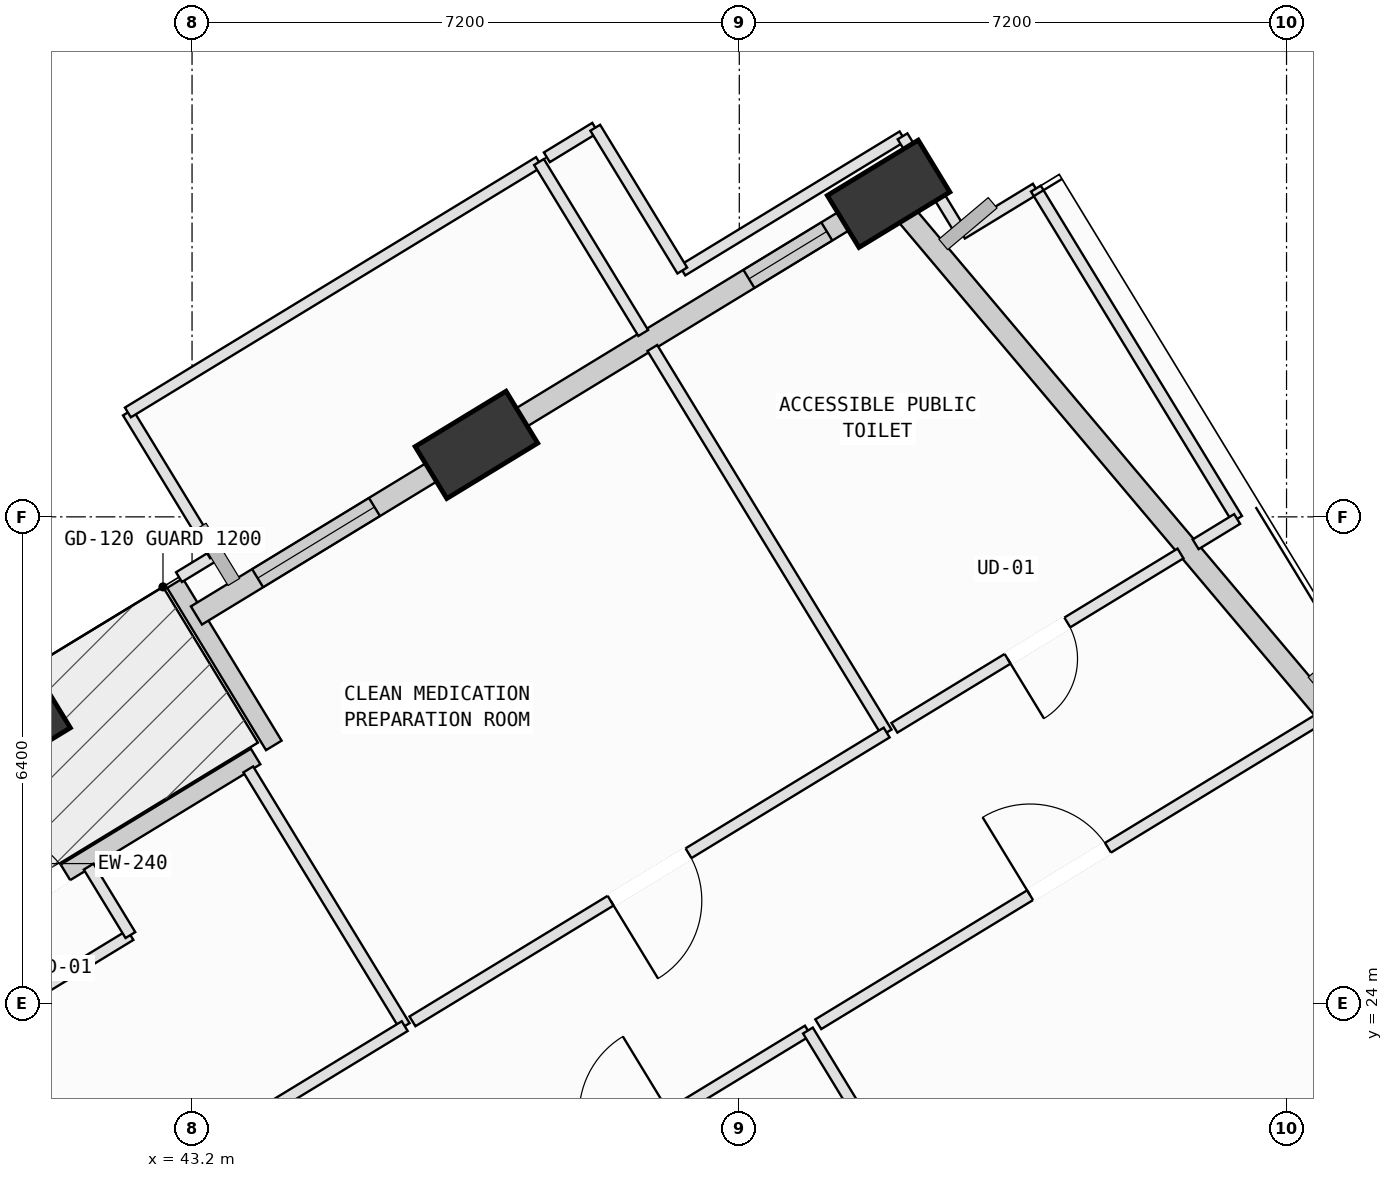
"""IFC4 building model, lengths in metres.
Left out: names, types, materials, properties, quantities, classifications, styles, units other than length and angle.
Written with IfcOpenShell. Run it as: python <this file> out.ifc"""

import sys

from ifc_helpers import new_model, si_unit, direction, frame, frame_2d, origin, origin_2d, place, context, subcontext, project, spatial, rectangle, extrude, element, fill, save


model = new_model("IFC4")
c1 = context("Model", 3, precision=1e-05, world=origin(), true_north=direction((0.0, 1.0)))
c2 = subcontext(c1, "Body", "Model", "MODEL_VIEW")
j1 = project(units=[si_unit("LENGTHUNIT", "METRE"), si_unit("PLANEANGLEUNIT", "RADIAN")], contexts=[c1])
p1 = place(None, origin())
s1 = spatial("IfcSite", under=j1, at=p1, CompositionType="ELEMENT")
p2 = place(p1, origin())
s2 = spatial("IfcBuilding", under=s1, at=p2, CompositionType="ELEMENT")
p3 = place(p2, frame((0.0, 0.0, 157.8)))
s3 = spatial("IfcBuildingStorey", under=s2, at=p3, CompositionType="ELEMENT", Elevation=157.8)
p4 = place(p3, frame((58.692, 27.147, 0.002), z_axis=(-0.010511571788, 0.103353662496, 0.994589124869), x_axis=(0.603537659278, -0.792383162423, 0.088719883581)))
e1 = element("IfcColumn", 1, at=p4, inside=s3, PredefinedType="COLUMN", context=c2, shape_type="SweptSolid", body=[
    extrude(rectangle(XDim=1.4, YDim=0.8, at=origin_2d()), origin(), (0.0, 0.0, 1.0), 4.018),
])
p5 = place(p3, frame((52.365, 34.651, 0.002), z_axis=(-0.041321821277, 0.077105666507, 0.996166262869), x_axis=(-0.507918360748, -0.860202023812, 0.045512822849)))
e2 = element("IfcColumn", 2, at=p5, inside=s3, PredefinedType="COLUMN", context=c2, shape_type="SweptSolid", body=[
    extrude(rectangle(XDim=1.4, YDim=0.8, at=origin_2d()), origin(), (0.0, 0.0, 1.0), 4.012),
])
p6 = place(p3, frame((46.942, 31.347, 0.002), z_axis=(-0.027560961981, 0.054938997223, 0.998109262535), x_axis=(-0.530488969192, -0.847088466236, 0.031977866333)))
e3 = element("IfcColumn", 3, at=p6, inside=s3, PredefinedType="COLUMN", context=c2, shape_type="SweptSolid", body=[
    extrude(rectangle(XDim=1.4, YDim=0.8, at=origin_2d()), origin(), (0.0, 0.0, 1.0), 4.004),
])
p7 = place(p3, frame((40.793, 27.601, 0.002), z_axis=(-0.011845597943, 0.029736114424, 0.999487591373), x_axis=(-0.600934371132, -0.799124871358, 0.016652974791)))
e4 = element("IfcColumn", 4, at=p7, inside=s3, PredefinedType="COLUMN", context=c2, shape_type="SweptSolid", body=[
    extrude(rectangle(XDim=1.4, YDim=0.8, at=origin_2d()), origin(), (0.0, 0.0, 1.0), 3.998),
])
p8 = place(p3, frame((38.093, 23.626, 0.0), z_axis=(0.0, 0.0, 1.0), x_axis=(0.854000704192, 0.520271849363, 0.0)))
e5 = element("IfcWall", 5, at=p8, inside=s3, PredefinedType="SOLIDWALL", context=c2, shape_type="SweptSolid", body=[
    extrude(rectangle(XDim=6.96, YDim=0.24, at=frame_2d((3.48, 0.0))), origin(), (0.0, 0.0, 1.0), 3.165),
])
p9 = place(p8, frame((2.93, 0.0, 0.0)))
e6 = element("IfcOpeningElement", 6, at=p9, cuts=e5, PredefinedType="OPENING", context=c2, shape_type="SweptSolid", body=[
    extrude(rectangle(XDim=1.1, YDim=2.15, at=frame_2d((0.55, 1.075))), frame((0.0, 0.13, 0.0), z_axis=(0.0, -1.0, 0.0), x_axis=(1.0, 0.0, 0.0)), (0.0, 0.0, 1.0), 0.26),
])
p10 = place(p3, frame((44.276, 27.393, 0.0), z_axis=(0.0, 0.0, 1.0), x_axis=(-0.520228849657, 0.854026898865, 0.0)))
e7 = element("IfcWall", 7, at=p10, inside=s3, PredefinedType="SOLIDWALL", context=c2, shape_type="SweptSolid", body=[
    extrude(rectangle(XDim=2.5, YDim=0.24, at=frame_2d((1.25, 0.0))), origin(), (0.0, 0.0, 1.0), 3.165),
])
p11 = place(p3, frame((52.573, 34.404, 0.0), z_axis=(0.0, 0.0, 1.0), x_axis=(0.644659621066, -0.764469733192, 0.0)))
e8 = element("IfcWall", 8, at=p11, inside=s3, PredefinedType="SOLIDWALL", context=c2, shape_type="SweptSolid", body=[
    extrude(rectangle(XDim=8.838, YDim=0.28, at=frame_2d((4.419, 0.0))), origin(), (0.0, 0.0, 1.0), 3.165),
])
p12 = place(p3, frame((47.361, 31.602, 0.0), z_axis=(0.0, 0.0, 1.0), x_axis=(0.853997871671, 0.520276498779, 0.0)))
e9 = element("IfcWall", 9, at=p12, inside=s3, PredefinedType="SOLIDWALL", context=c2, shape_type="SweptSolid", body=[
    extrude(rectangle(XDim=5.405, YDim=0.28, at=frame_2d((2.702, 0.0))), origin(), (0.0, 0.0, 1.0), 3.065),
])
p13 = place(p12, frame((3.707, 0.0, 0.75)))
e10 = element("IfcOpeningElement", 10, at=p13, cuts=e9, PredefinedType="OPENING", context=c2, shape_type="SweptSolid", body=[
    extrude(rectangle(XDim=1.2, YDim=1.75, at=frame_2d((0.6, 0.875))), frame((0.0, 0.15, 0.0), z_axis=(0.0, -1.0, 0.0), x_axis=(1.0, 0.0, 0.0)), (0.0, 0.0, 1.0), 0.3),
])
p14 = place(p3, frame((43.258, 29.103, 0.0), z_axis=(0.0, 0.0, 1.0), x_axis=(0.853981369465, 0.520303585041, 0.0)))
e11 = element("IfcWall", 11, at=p14, inside=s3, PredefinedType="SOLIDWALL", context=c2, shape_type="SweptSolid", body=[
    extrude(rectangle(XDim=3.844, YDim=0.28, at=frame_2d((1.922, 0.0))), origin(), (0.0, 0.0, 1.0), 3.145),
])
p15 = place(p14, frame((0.943, 0.0, 0.75)))
e12 = element("IfcOpeningElement", 12, at=p15, cuts=e11, PredefinedType="OPENING", context=c2, shape_type="SweptSolid", body=[
    extrude(rectangle(XDim=1.8, YDim=2.05, at=frame_2d((0.9, 1.025))), frame((0.0, 0.15, 0.0), z_axis=(0.0, -1.0, 0.0), x_axis=(1.0, 0.0, 0.0)), (0.0, 0.0, 1.0), 0.3),
])
p16 = place(p3, frame((46.657, 20.811, 0.0), z_axis=(0.0, 0.0, 1.0), x_axis=(0.85402865448, 0.520225967563, 0.0)))
e13 = element("IfcWall", 13, at=p16, inside=s3, PredefinedType="PARTITIONING", context=c2, shape_type="SweptSolid", body=[
    extrude(rectangle(XDim=5.44, YDim=0.15, at=frame_2d((2.72, 0.0))), origin(), (0.0, 0.0, 1.0), 3.065),
])
p17 = place(p16, frame((2.12, 0.0, 0.0)))
e14 = element("IfcOpeningElement", 14, at=p17, cuts=e13, PredefinedType="OPENING", context=c2, shape_type="SweptSolid", body=[
    extrude(rectangle(XDim=1.2, YDim=2.15, at=frame_2d((0.6, 1.075))), frame((0.0, 0.085, 0.0), z_axis=(0.0, -1.0, 0.0), x_axis=(1.0, 0.0, 0.0)), (0.0, 0.0, 1.0), 0.17),
])
p18 = place(p3, frame((51.303, 23.641, 0.0), z_axis=(0.0, 0.0, 1.0), x_axis=(0.520220768099, -0.854031821678, 0.0)))
e15 = element("IfcWall", 15, at=p18, inside=s3, PredefinedType="PARTITIONING", context=c2, shape_type="SweptSolid", body=[
    extrude(rectangle(XDim=11.935, YDim=0.15, at=frame_2d((5.968, 0.0))), origin(), (0.0, 0.0, 1.0), 3.78),
])
p19 = place(p3, frame((51.439, 23.724, 0.0), z_axis=(0.0, 0.0, 1.0), x_axis=(0.854030727283, 0.520222564732, 0.0)))
e16 = element("IfcWall", 16, at=p19, inside=s3, PredefinedType="PARTITIONING", context=c2, shape_type="SweptSolid", body=[
    extrude(rectangle(XDim=7.727, YDim=0.15, at=frame_2d((3.864, 0.0))), origin(), (0.0, 0.0, 1.0), 3.065),
])
p20 = place(p19, frame((3.263, 0.0, 0.0)))
e17 = element("IfcOpeningElement", 17, at=p20, cuts=e16, PredefinedType="OPENING", context=c2, shape_type="SweptSolid", body=[
    extrude(rectangle(XDim=1.2, YDim=2.15, at=frame_2d((0.6, 1.075))), frame((0.0, 0.085, 0.0), z_axis=(0.0, -1.0, 0.0), x_axis=(1.0, 0.0, 0.0)), (0.0, 0.0, 1.0), 0.17),
])
p21 = place(p3, frame((40.937, 24.012, 0.0), z_axis=(0.0, 0.0, 1.0), x_axis=(0.853873996169, 0.520479777385, 0.0)))
e18 = element("IfcWall", 18, at=p21, inside=s3, PredefinedType="PARTITIONING", context=c2, shape_type="SweptSolid", body=[
    extrude(rectangle(XDim=1.7, YDim=0.15, at=frame_2d((0.85, 0.0))), origin(), (0.0, 0.0, 1.0), 3.065),
])
p22 = place(p3, frame((42.389, 24.897, 0.0), z_axis=(0.0, 0.0, 1.0), x_axis=(-0.520167150094, 0.85406447998, 0.0)))
e19 = element("IfcWall", 19, at=p22, inside=s3, PredefinedType="PARTITIONING", context=c2, shape_type="SweptSolid", body=[
    extrude(rectangle(XDim=1.055, YDim=0.15, at=frame_2d((0.528, 0.0))), origin(), (0.0, 0.0, 1.0), 3.78),
])
p23 = place(p3, frame((43.94, 27.077, 0.0), z_axis=(0.0, 0.0, 1.0), x_axis=(0.52031109825, -0.853976791861, 0.0)))
e20 = element("IfcWall", 20, at=p23, inside=s3, PredefinedType="PARTITIONING", context=c2, shape_type="SweptSolid", body=[
    extrude(rectangle(XDim=3.956, YDim=0.15, at=frame_2d((1.978, 0.0))), origin(), (0.0, 0.0, 1.0), 3.415),
])
p24 = place(p3, frame((45.998, 23.699, 0.0), z_axis=(0.0, 0.0, 1.0), x_axis=(-0.854066940543, -0.520163110065, 0.0)))
e21 = element("IfcWall", 21, at=p24, inside=s3, PredefinedType="PARTITIONING", context=c2, shape_type="SweptSolid", body=[
    extrude(rectangle(XDim=5.804, YDim=0.15, at=frame_2d((2.902, 0.0))), origin(), (0.0, 0.0, 1.0), 3.78),
])
p25 = place(p3, frame((43.028, 29.607, 0.0), z_axis=(0.0, 0.0, 1.0), x_axis=(0.854011196361, 0.520254626591, 0.0)))
e22 = element("IfcWall", 22, at=p25, inside=s3, PredefinedType="PARTITIONING", context=c2, shape_type="SweptSolid", body=[
    extrude(rectangle(XDim=0.554, YDim=0.15, at=frame_2d((0.277, 0.0))), origin(), (0.0, 0.0, 1.0), 3.145),
])
p26 = place(p3, frame((43.501, 29.895, 0.0), z_axis=(0.0, 0.0, 1.0), x_axis=(-0.520390400484, 0.853928469536, 0.0)))
e23 = element("IfcWall", 23, at=p26, inside=s3, PredefinedType="PARTITIONING", context=c2, shape_type="SweptSolid", body=[
    extrude(rectangle(XDim=2.2, YDim=0.15, at=frame_2d((1.1, 0.0))), origin(), (0.0, 0.0, 1.0), 3.78),
])
p27 = place(p3, frame((42.356, 31.774, 0.0), z_axis=(0.0, 0.0, 1.0), x_axis=(0.854004220145, 0.520266078055, 0.0)))
e24 = element("IfcWall", 24, at=p27, inside=s3, PredefinedType="PARTITIONING", context=c2, shape_type="SweptSolid", body=[
    extrude(rectangle(XDim=6.333, YDim=0.15, at=frame_2d((3.167, 0.0))), origin(), (0.0, 0.0, 1.0), 3.78),
])
p28 = place(p3, frame((47.765, 35.069, 0.0), z_axis=(0.0, 0.0, 1.0), x_axis=(0.520370172675, -0.853940796185, 0.0)))
e25 = element("IfcWall", 25, at=p28, inside=s3, PredefinedType="PARTITIONING", context=c2, shape_type="SweptSolid", body=[
    extrude(rectangle(XDim=2.635, YDim=0.15, at=frame_2d((1.317, 0.0))), origin(), (0.0, 0.0, 1.0), 3.78),
])
p29 = place(p3, frame((49.256, 32.622, 0.0), z_axis=(0.0, 0.0, 1.0), x_axis=(0.520312896465, -0.853975696242, 0.0)))
e26 = element("IfcWall", 26, at=p29, inside=s3, PredefinedType="PARTITIONING", context=c2, shape_type="SweptSolid", body=[
    extrude(rectangle(XDim=5.925, YDim=0.15, at=frame_2d((2.963, 0.0))), origin(), (0.0, 0.0, 1.0), 3.78),
])
p30 = place(p3, frame((52.339, 27.562, 0.0), z_axis=(0.0, 0.0, 1.0), x_axis=(-0.85405331728, -0.520185477733, 0.0)))
e27 = element("IfcWall", 27, at=p30, inside=s3, PredefinedType="PARTITIONING", context=c2, shape_type="SweptSolid", body=[
    extrude(rectangle(XDim=7.305, YDim=0.15, at=frame_2d((3.653, 0.0))), origin(), (0.0, 0.0, 1.0), 3.78),
])
p31 = place(p30, frame((3.052, 0.0, 0.0)))
e28 = element("IfcOpeningElement", 28, at=p31, cuts=e27, PredefinedType="OPENING", context=c2, shape_type="SweptSolid", body=[
    extrude(rectangle(XDim=1.2, YDim=2.15, at=frame_2d((0.6, 1.075))), frame((0.0, 0.085, 0.0), z_axis=(0.0, -1.0, 0.0), x_axis=(1.0, 0.0, 0.0)), (0.0, 0.0, 1.0), 0.17),
])
p32 = place(p3, frame((49.65, 33.641, 0.0), z_axis=(0.0, 0.0, 1.0), x_axis=(0.853969265072, 0.520323451627, 0.0)))
e29 = element("IfcWall", 29, at=p32, inside=s3, PredefinedType="PARTITIONING", context=c2, shape_type="SweptSolid", body=[
    extrude(rectangle(XDim=3.394, YDim=0.15, at=frame_2d((1.697, 0.0))), origin(), (0.0, 0.0, 1.0), 3.065),
])
p33 = place(p3, frame((52.548, 35.407, 0.0), z_axis=(0.0, 0.0, 1.0), x_axis=(0.520561131916, -0.853824401114, 0.0)))
e30 = element("IfcWall", 30, at=p33, inside=s3, PredefinedType="PARTITIONING", context=c2, shape_type="SweptSolid", body=[
    extrude(rectangle(XDim=1.5, YDim=0.15, at=frame_2d((0.75, 0.0))), origin(), (0.0, 0.0, 1.0), 3.165),
])
p34 = place(p3, frame((53.329, 34.126, 0.0), z_axis=(0.0, 0.0, 1.0), x_axis=(0.85387979276, 0.520470267657, 0.0)))
e31 = element("IfcWall", 31, at=p34, inside=s3, PredefinedType="PARTITIONING", context=c2, shape_type="SweptSolid", body=[
    extrude(rectangle(XDim=1.139, YDim=0.15, at=frame_2d((0.57, 0.0))), origin(), (0.0, 0.0, 1.0), 3.78),
])
p35 = place(p3, frame((54.302, 34.719, 0.0), z_axis=(0.0, 0.0, 1.0), x_axis=(0.520232990143, -0.854024376682, 0.0)))
e32 = element("IfcWall", 32, at=p35, inside=s3, PredefinedType="PARTITIONING", context=c2, shape_type="SweptSolid", body=[
    extrude(rectangle(XDim=5.09, YDim=0.15, at=frame_2d((2.545, 0.0))), origin(), (0.0, 0.0, 1.0), 3.78),
])
p36 = place(p3, frame((56.95, 30.372, 0.0), z_axis=(0.0, 0.0, 1.0), x_axis=(-0.853696820329, -0.520770332258, 0.0)))
e33 = element("IfcWall", 33, at=p36, inside=s3, PredefinedType="PARTITIONING", context=c2, shape_type="SweptSolid", body=[
    extrude(rectangle(XDim=0.639, YDim=0.15, at=frame_2d((0.32, 0.0))), origin(), (0.0, 0.0, 1.0), 3.78),
])
p37 = place(p3, frame((56.205, 29.918, 0.0), z_axis=(0.0, 0.0, 1.0), x_axis=(-0.854023088478, -0.520235104877, 0.0)))
e34 = element("IfcWall", 34, at=p37, inside=s3, PredefinedType="PARTITIONING", context=c2, shape_type="SweptSolid", body=[
    extrude(rectangle(XDim=4.407, YDim=0.15, at=frame_2d((2.204, 0.0))), origin(), (0.0, 0.0, 1.0), 3.78),
])
p38 = place(p37, frame((1.744, 0.0, 0.0)))
e35 = element("IfcOpeningElement", 35, at=p38, cuts=e34, PredefinedType="OPENING", context=c2, shape_type="SweptSolid", body=[
    extrude(rectangle(XDim=0.92, YDim=2.1, at=frame_2d((0.46, 1.05))), frame((0.0, 0.085, 0.0), z_axis=(0.0, -1.0, 0.0), x_axis=(1.0, 0.0, 0.0)), (0.0, 0.0, 1.0), 0.17),
])
p39 = place(p3, frame((47.868, 35.131, 0.0), z_axis=(0.0, 0.0, 1.0), x_axis=(0.853483928933, 0.521119163967, 0.0)))
e36 = element("IfcWall", 36, at=p39, inside=s3, PredefinedType="PARTITIONING", context=c2, shape_type="SweptSolid", body=[
    extrude(rectangle(XDim=0.746, YDim=0.15, at=frame_2d((0.373, 0.0))), origin(), (0.0, 0.0, 1.0), 3.78),
])
p40 = place(p3, frame((48.505, 35.52, 0.0), z_axis=(0.0, 0.0, 1.0), x_axis=(0.520390400484, -0.853928469536, 0.0)))
e37 = element("IfcWall", 37, at=p40, inside=s3, PredefinedType="PARTITIONING", context=c2, shape_type="SweptSolid", body=[
    extrude(rectangle(XDim=2.2, YDim=0.15, at=frame_2d((1.1, 0.0))), origin(), (0.0, 0.0, 1.0), 3.78),
])
p41 = place(p9, origin())
e38 = element("IfcDoor", 38, at=p41, inside=s3, OperationType="SINGLE_SWING_LEFT", PredefinedType="DOOR", context=c2, shape_type="SweptSolid", body=[
    extrude(rectangle(XDim=1.1, YDim=2.15, at=frame_2d((0.55, 1.075))), frame((0.0, 0.025, 0.0), z_axis=(0.0, -1.0, 0.0), x_axis=(1.0, 0.0, 0.0)), (0.0, 0.0, 1.0), 0.05),
])
fill(e6, e38)
p42 = place(p13, origin())
e39 = element("IfcWindow", 39, at=p42, inside=s3, PartitioningType="SINGLE_PANEL", PredefinedType="WINDOW", context=c2, shape_type="SweptSolid", body=[
    extrude(rectangle(XDim=1.2, YDim=1.75, at=frame_2d((0.6, 0.875))), frame((0.0, 0.03, 0.0), z_axis=(0.0, -1.0, 0.0), x_axis=(1.0, 0.0, 0.0)), (0.0, 0.0, 1.0), 0.06),
])
fill(e10, e39)
p43 = place(p15, origin())
e40 = element("IfcWindow", 40, at=p43, inside=s3, PartitioningType="SINGLE_PANEL", PredefinedType="WINDOW", context=c2, shape_type="SweptSolid", body=[
    extrude(rectangle(XDim=1.8, YDim=2.05, at=frame_2d((0.9, 1.025))), frame((0.0, 0.03, 0.0), z_axis=(0.0, -1.0, 0.0), x_axis=(1.0, 0.0, 0.0)), (0.0, 0.0, 1.0), 0.06),
])
fill(e12, e40)
p44 = place(p20, origin())
e41 = element("IfcDoor", 41, at=p44, inside=s3, OperationType="SINGLE_SWING_LEFT", PredefinedType="DOOR", context=c2, shape_type="SweptSolid", body=[
    extrude(rectangle(XDim=1.2, YDim=2.15, at=frame_2d((0.6, 1.075))), frame((0.0, 0.025, 0.0), z_axis=(0.0, -1.0, 0.0), x_axis=(1.0, 0.0, 0.0)), (0.0, 0.0, 1.0), 0.05),
])
fill(e17, e41)
p45 = place(p31, origin())
e42 = element("IfcDoor", 42, at=p45, inside=s3, OperationType="SINGLE_SWING_RIGHT", PredefinedType="DOOR", context=c2, shape_type="SweptSolid", body=[
    extrude(rectangle(XDim=1.2, YDim=2.15, at=frame_2d((0.6, 1.075))), frame((0.0, 0.025, 0.0), z_axis=(0.0, -1.0, 0.0), x_axis=(1.0, 0.0, 0.0)), (0.0, 0.0, 1.0), 0.05),
])
fill(e28, e42)
p46 = place(p38, origin())
e43 = element("IfcDoor", 43, at=p46, inside=s3, OperationType="SINGLE_SWING_RIGHT", PredefinedType="DOOR", context=c2, shape_type="SweptSolid", body=[
    extrude(rectangle(XDim=0.92, YDim=2.1, at=frame_2d((0.46, 1.05))), frame((0.0, 0.025, 0.0), z_axis=(0.0, -1.0, 0.0), x_axis=(1.0, 0.0, 0.0)), (0.0, 0.0, 1.0), 0.05),
])
fill(e35, e43)
save(model, sys.argv[1])
